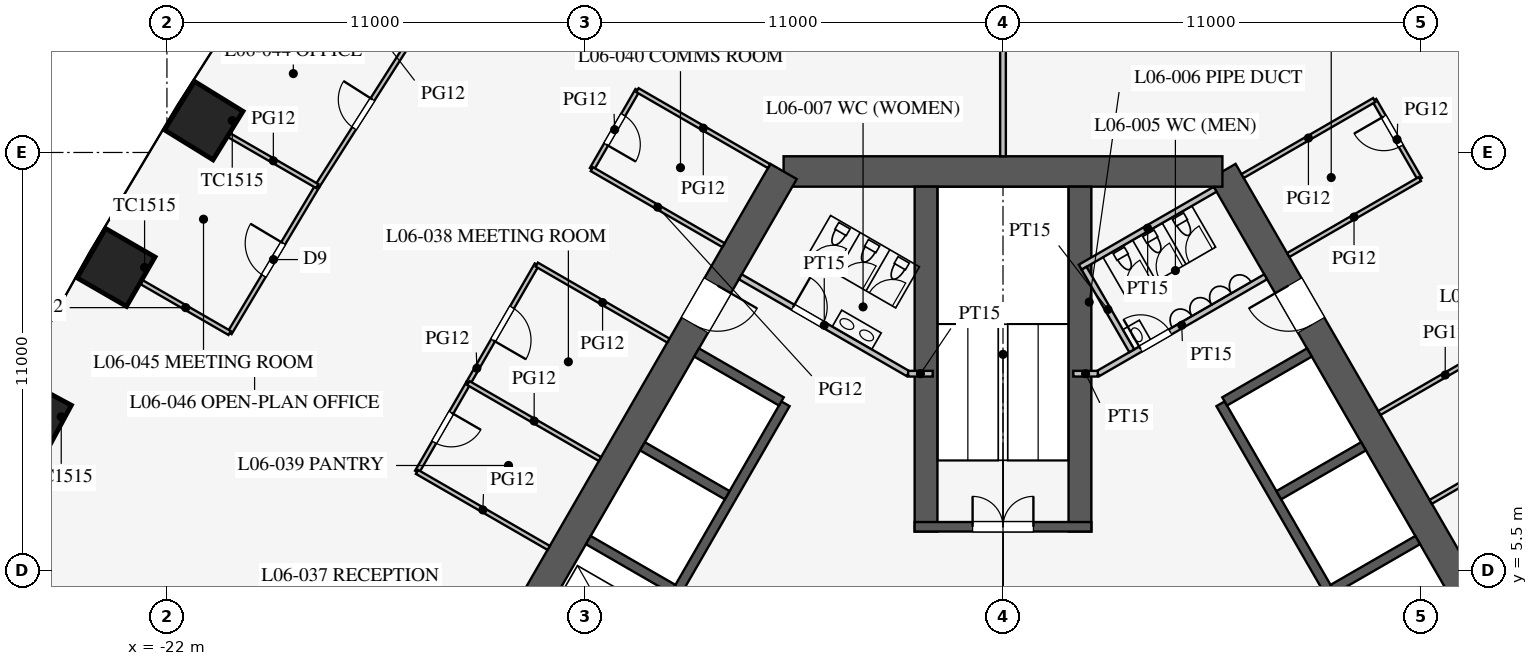
"""IFC4 building model, lengths in metres.
Left out: names, types, materials, properties, quantities, classifications, styles, units other than length and angle.
Written with IfcOpenShell. Run it as: python <this file> out.ifc"""

import sys

from ifc_helpers import new_model, si_unit, direction, frame, frame_2d, origin, origin_2d, place, context, subcontext, project, spatial, rectangle, extrude, element, fill, save


model = new_model("IFC4")
c1 = context("Model", 3, precision=1e-05, world=origin(), true_north=direction((0.0, 1.0)))
c2 = subcontext(c1, "Body", "Model", "MODEL_VIEW")
j1 = project(units=[si_unit("LENGTHUNIT", "METRE"), si_unit("PLANEANGLEUNIT", "RADIAN")], contexts=[c1])
p1 = place(None, origin())
s1 = spatial("IfcSite", under=j1, at=p1, CompositionType="ELEMENT")
p2 = place(p1, origin())
s2 = spatial("IfcBuilding", under=s1, at=p2, CompositionType="ELEMENT")
p3 = place(p2, frame((0.0, 0.0, 29.1)))
s3 = spatial("IfcBuildingStorey", under=s2, at=p3, CompositionType="ELEMENT", Elevation=29.1)
for number, where, z_axis, x_axis in (
    (1, (-21.031, 17.339, 0.0), (0.0, 0.0, 1.0), (-0.525, -0.851, 0.0)),
    (2, (-23.338, 13.474, 0.0), (0.0, 0.0, 1.0), (-0.5, -0.866, 0.0)),
    (3, (-25.531, 9.544, 0.0), (0.0, 0.0, 1.0), (-0.475, -0.88, 0.0)),
):
    element("IfcColumn", number, at=place(p3, frame(where, z_axis=z_axis, x_axis=x_axis)), inside=s3, PredefinedType="COLUMN", context=c2, shape_type="SweptSolid", body=[
        extrude(rectangle(XDim=1.5, YDim=1.5, at=origin_2d()), origin(), (0.0, 0.0, 1.0), 4.2),
    ])
p4 = place(p3, frame((16.743, -3.0, 0.0), z_axis=(0.0, 0.0, 1.0), x_axis=(-0.500002442456, 0.866023993627, 0.0)))
e4 = element("IfcWall", 4, at=p4, inside=s3, PredefinedType="SHEAR", context=c2, shape_type="SweptSolid", body=[
    extrude(rectangle(XDim=21.939, YDim=0.8, at=frame_2d((10.97, 0.0))), origin(), (0.0, 0.0, 1.0), 4.2),
])
p5 = place(p4, frame((17.27, 0.0, 0.0)))
e5 = element("IfcOpeningElement", 5, at=p5, cuts=e4, PredefinedType="OPENING", context=c2, shape_type="SweptSolid", body=[
    extrude(rectangle(XDim=1.2, YDim=2.1, at=frame_2d((0.6, 1.05))), frame((0.0, 0.41, 0.0), z_axis=(0.0, -1.0, 0.0), x_axis=(1.0, 0.0, 0.0)), (0.0, 0.0, 1.0), 0.82),
])
p6 = place(p4, frame((3.47, 0.0, 0.0)))
e6 = element("IfcOpeningElement", 6, at=p6, cuts=e4, PredefinedType="OPENING", context=c2, shape_type="SweptSolid", body=[
    extrude(rectangle(XDim=1.2, YDim=2.1, at=frame_2d((0.6, 1.05))), frame((0.0, 0.41, 0.0), z_axis=(0.0, -1.0, 0.0), x_axis=(1.0, 0.0, 0.0)), (0.0, 0.0, 1.0), 0.82),
])
p7 = place(p3, frame((5.773, 16.0, 0.0), z_axis=(0.0, 0.0, 1.0), x_axis=(-1.0, 0.0, 0.0)))
e7 = element("IfcWall", 7, at=p7, inside=s3, PredefinedType="SHEAR", context=c2, shape_type="SweptSolid", body=[
    extrude(rectangle(XDim=11.547, YDim=0.8, at=frame_2d((5.773, 0.0))), origin(), (0.0, 0.0, 1.0), 4.2),
])
p8 = place(p3, frame((-5.773, 16.0, 0.0), z_axis=(0.0, 0.0, 1.0), x_axis=(-0.500002442456, -0.866023993627, 0.0)))
e8 = element("IfcWall", 8, at=p8, inside=s3, PredefinedType="SHEAR", context=c2, shape_type="SweptSolid", body=[
    extrude(rectangle(XDim=21.939, YDim=0.8, at=frame_2d((10.97, 0.0))), origin(), (0.0, 0.0, 1.0), 4.2),
])
p9 = place(p8, frame((17.27, 0.0, 0.0)))
e9 = element("IfcOpeningElement", 9, at=p9, cuts=e8, PredefinedType="OPENING", context=c2, shape_type="SweptSolid", body=[
    extrude(rectangle(XDim=1.2, YDim=2.1, at=frame_2d((0.6, 1.05))), frame((0.0, 0.41, 0.0), z_axis=(0.0, -1.0, 0.0), x_axis=(1.0, 0.0, 0.0)), (0.0, 0.0, 1.0), 0.82),
])
p10 = place(p8, frame((3.47, 0.0, 0.0)))
e10 = element("IfcOpeningElement", 10, at=p10, cuts=e8, PredefinedType="OPENING", context=c2, shape_type="SweptSolid", body=[
    extrude(rectangle(XDim=1.2, YDim=2.1, at=frame_2d((0.6, 1.05))), frame((0.0, 0.41, 0.0), z_axis=(0.0, -1.0, 0.0), x_axis=(1.0, 0.0, 0.0)), (0.0, 0.0, 1.0), 0.82),
])
p11 = place(p3, frame((11.424, 0.014, 0.0), z_axis=(0.0, 0.0, 1.0), x_axis=(-0.500001763848, 0.866024385424, 0.0)))
e11 = element("IfcWall", 11, at=p11, inside=s3, PredefinedType="SHEAR", context=c2, shape_type="SweptSolid", body=[
    extrude(rectangle(XDim=11.4, YDim=0.25, at=frame_2d((5.7, 0.0))), origin(), (0.0, 0.0, 1.0), 4.2),
])
for number, where, z_axis, x_axis in (
    (12, (8.682, 5.012, 0.0), (0.0, 0.0, 1.0), (0.866, 0.5, 0.0)),
    (13, (7.257, 7.481, 0.0), (0.0, 0.0, 1.0), (0.866, 0.5, 0.0)),
):
    element("IfcWall", number, at=place(p3, frame(where, z_axis=z_axis, x_axis=x_axis)), inside=s3, PredefinedType="SHEAR", context=c2, shape_type="SweptSolid", body=[
        extrude(rectangle(XDim=2.575, YDim=0.25, at=frame_2d((1.288, 0.0))), origin(), (0.0, 0.0, 1.0), 4.2),
    ])
p12 = place(p3, frame((5.832, 9.949, 0.0), z_axis=(0.0, 0.0, 1.0), x_axis=(0.866029291668, 0.499993265928, 0.0)))
e14 = element("IfcWall", 14, at=p12, inside=s3, PredefinedType="SHEAR", context=c2, shape_type="SweptSolid", body=[
    extrude(rectangle(XDim=2.575, YDim=0.25, at=frame_2d((1.288, 0.0))), origin(), (0.0, 0.0, 1.0), 4.2),
])
p13 = place(p3, frame((-5.724, 9.886, 0.0), z_axis=(0.0, 0.0, 1.0), x_axis=(-0.500001763848, -0.866024385424, 0.0)))
e15 = element("IfcWall", 15, at=p13, inside=s3, PredefinedType="SHEAR", context=c2, shape_type="SweptSolid", body=[
    extrude(rectangle(XDim=11.4, YDim=0.25, at=frame_2d((5.7, 0.0))), origin(), (0.0, 0.0, 1.0), 4.2),
])
p14 = place(p13, frame((6.525, 0.0, 0.0)))
e16 = element("IfcOpeningElement", 16, at=p14, cuts=e15, PredefinedType="OPENING", context=c2, shape_type="SweptSolid", body=[
    extrude(rectangle(XDim=1.2, YDim=2.2, at=frame_2d((0.6, 1.1))), frame((0.0, 0.135, 0.0), z_axis=(0.0, -1.0, 0.0), x_axis=(1.0, 0.0, 0.0)), (0.0, 0.0, 1.0), 0.27),
])
p15 = place(p13, frame((9.375, 0.0, 0.0)))
e17 = element("IfcOpeningElement", 17, at=p15, cuts=e15, PredefinedType="OPENING", context=c2, shape_type="SweptSolid", body=[
    extrude(rectangle(XDim=1.2, YDim=2.2, at=frame_2d((0.6, 1.1))), frame((0.0, 0.135, 0.0), z_axis=(0.0, -1.0, 0.0), x_axis=(1.0, 0.0, 0.0)), (0.0, 0.0, 1.0), 0.27),
])
p16 = place(p3, frame((-5.832, 9.949, 0.0), z_axis=(0.0, 0.0, 1.0), x_axis=(-0.866029291668, 0.499993265928, 0.0)))
e18 = element("IfcWall", 18, at=p16, inside=s3, PredefinedType="SHEAR", context=c2, shape_type="SweptSolid", body=[
    extrude(rectangle(XDim=2.575, YDim=0.25, at=frame_2d((1.288, 0.0))), origin(), (0.0, 0.0, 1.0), 4.2),
])
for number, where, z_axis, x_axis in (
    (19, (-7.257, 7.481, 0.0), (0.0, 0.0, 1.0), (-0.866, 0.5, 0.0)),
    (20, (-8.682, 5.012, 0.0), (0.0, 0.0, 1.0), (-0.866, 0.5, 0.0)),
):
    element("IfcWall", number, at=place(p3, frame(where, z_axis=z_axis, x_axis=x_axis)), inside=s3, PredefinedType="SHEAR", context=c2, shape_type="SweptSolid", body=[
        extrude(rectangle(XDim=2.575, YDim=0.25, at=frame_2d((1.288, 0.0))), origin(), (0.0, 0.0, 1.0), 4.2),
    ])
for number, where, z_axis, x_axis in (
    (21, (2.025, 6.525, 0.0), (0.0, 0.0, 1.0), (0.0, 1.0, 0.0)),
    (22, (-2.025, 6.525, 0.0), (0.0, 0.0, 1.0), (0.0, 1.0, 0.0)),
):
    element("IfcWall", number, at=place(p3, frame(where, z_axis=z_axis, x_axis=x_axis)), inside=s3, PredefinedType="SHEAR", context=c2, shape_type="SweptSolid", body=[
        extrude(rectangle(XDim=9.075, YDim=0.6, at=frame_2d((4.538, 0.0))), origin(), (0.0, 0.0, 1.0), 4.2),
    ])
p17 = place(p3, frame((2.325, 6.65, 0.0), z_axis=(0.0, 0.0, 1.0), x_axis=(-1.0, 0.0, 0.0)))
e23 = element("IfcWall", 23, at=p17, inside=s3, PredefinedType="SHEAR", context=c2, shape_type="SweptSolid", body=[
    extrude(rectangle(XDim=4.65, YDim=0.25, at=frame_2d((2.325, 0.0))), origin(), (0.0, 0.0, 1.0), 4.2),
])
p18 = place(p17, frame((1.525, 0.0, 0.0)))
e24 = element("IfcOpeningElement", 24, at=p18, cuts=e23, PredefinedType="OPENING", context=c2, shape_type="SweptSolid", body=[
    extrude(rectangle(XDim=1.6, YDim=2.1, at=frame_2d((0.8, 1.05))), frame((0.0, 0.135, 0.0), z_axis=(0.0, -1.0, 0.0), x_axis=(1.0, 0.0, 0.0)), (0.0, 0.0, 1.0), 0.27),
])
p19 = place(p3, frame((2.495, 10.678, 0.0), z_axis=(0.0, 0.0, 1.0), x_axis=(0.86602216432, 0.500005610874, 0.0)))
e25 = element("IfcWall", 25, at=p19, inside=s3, PredefinedType="PARTITIONING", context=c2, shape_type="SweptSolid", body=[
    extrude(rectangle(XDim=5.1, YDim=0.15, at=frame_2d((2.55, 0.0))), origin(), (0.0, 0.0, 1.0), 4.0),
])
p20 = place(p19, frame((1.3, 0.0, 0.0)))
e26 = element("IfcOpeningElement", 26, at=p20, cuts=e25, PredefinedType="OPENING", context=c2, shape_type="SweptSolid", body=[
    extrude(rectangle(XDim=0.9, YDim=2.1, at=frame_2d((0.45, 1.05))), frame((0.0, 0.085, 0.0), z_axis=(0.0, -1.0, 0.0), x_axis=(1.0, 0.0, 0.0)), (0.0, 0.0, 1.0), 0.17),
])
p21 = place(p3, frame((-2.495, 10.678, 0.0), z_axis=(0.0, 0.0, 1.0), x_axis=(-0.86602216432, 0.500005610874, 0.0)))
e27 = element("IfcWall", 27, at=p21, inside=s3, PredefinedType="PARTITIONING", context=c2, shape_type="SweptSolid", body=[
    extrude(rectangle(XDim=5.1, YDim=0.15, at=frame_2d((2.55, 0.0))), origin(), (0.0, 0.0, 1.0), 4.0),
])
p22 = place(p21, frame((2.6, 0.0, 0.0)))
e28 = element("IfcOpeningElement", 28, at=p22, cuts=e27, PredefinedType="OPENING", context=c2, shape_type="SweptSolid", body=[
    extrude(rectangle(XDim=0.9, YDim=2.1, at=frame_2d((0.45, 1.05))), frame((0.0, 0.085, 0.0), z_axis=(0.0, -1.0, 0.0), x_axis=(1.0, 0.0, 0.0)), (0.0, 0.0, 1.0), 0.17),
])
for number, where, z_axis, x_axis in (
    (29, (2.495, 10.678, 0.0), (0.0, 0.0, 1.0), (-1.0, 0.0, 0.0)),
    (30, (-2.495, 10.678, 0.0), (0.0, 0.0, 1.0), (1.0, 0.0, 0.0)),
):
    element("IfcWall", number, at=place(p3, frame(where, z_axis=z_axis, x_axis=x_axis)), inside=s3, PredefinedType="PARTITIONING", context=c2, shape_type="SweptSolid", body=[
        extrude(rectangle(XDim=0.645, YDim=0.15, at=frame_2d((0.323, 0.0))), origin(), (0.0, 0.0, 1.0), 4.0),
    ])
p23 = place(p3, frame((2.031, 13.482, 0.0), z_axis=(0.0, 0.0, 1.0), x_axis=(0.866050731258, 0.499956128963, 0.0)))
e31 = element("IfcWall", 31, at=p23, inside=s3, PredefinedType="PARTITIONING", context=c2, shape_type="SweptSolid", body=[
    extrude(rectangle(XDim=4.1, YDim=0.15, at=frame_2d((2.05, 0.0))), origin(), (0.0, 0.0, 1.0), 4.0),
])
p24 = place(p3, frame((3.389, 11.281, 0.0), z_axis=(0.0, 0.0, 1.0), x_axis=(-0.499989096993, 0.866031698547, 0.0)))
e32 = element("IfcWall", 32, at=p24, inside=s3, PredefinedType="PARTITIONING", context=c2, shape_type="SweptSolid", body=[
    extrude(rectangle(XDim=2.51, YDim=0.15, at=frame_2d((1.255, 0.0))), origin(), (0.0, 0.0, 1.0), 4.0),
])
p25 = place(p3, frame((0.0, 16.4, 0.0), z_axis=(0.0, 0.0, 1.0), x_axis=(0.0, 1.0, 0.0)))
e33 = element("IfcWall", 33, at=p25, inside=s3, PredefinedType="PARTITIONING", context=c2, shape_type="SweptSolid", body=[
    extrude(rectangle(XDim=18.25, YDim=0.15, at=frame_2d((9.125, 0.0))), origin(), (0.0, 0.0, 1.0), 2.3),
])
p26 = place(p3, frame((10.969, 15.802, 0.0), z_axis=(0.0, 0.0, 1.0), x_axis=(-0.500001309137, 0.866024647952, 0.0)))
e34 = element("IfcWall", 34, at=p26, inside=s3, PredefinedType="PARTITIONING", context=c2, shape_type="SweptSolid", body=[
    extrude(rectangle(XDim=2.4, YDim=0.12, at=frame_2d((1.2, 0.0))), origin(), (0.0, 0.0, 1.0), 2.9),
])
p27 = place(p26, frame((1.0, 0.0, 0.15)))
e35 = element("IfcOpeningElement", 35, at=p27, cuts=e34, PredefinedType="OPENING", context=c2, shape_type="SweptSolid", body=[
    extrude(rectangle(XDim=0.9, YDim=2.1, at=frame_2d((0.45, 1.05))), frame((0.0, 0.07, 0.0), z_axis=(0.0, -1.0, 0.0), x_axis=(1.0, 0.0, 0.0)), (0.0, 0.0, 1.0), 0.14),
])
for number, where, z_axis, x_axis in (
    (36, (11.255, 7.306, 0.0), (0.0, 0.0, 1.0), (0.866, 0.5, 0.0)),
    (37, (6.305, 15.88, 0.0), (0.0, 0.0, 1.0), (0.866, 0.5, 0.0)),
    (38, (9.905, 9.645, 0.0), (0.0, 0.0, 1.0), (0.866, 0.5, 0.0)),
    (39, (7.505, 13.802, 0.0), (0.0, 0.0, 1.0), (0.866, 0.5, 0.0)),
):
    element("IfcWall", number, at=place(p3, frame(where, z_axis=z_axis, x_axis=x_axis)), inside=s3, PredefinedType="PARTITIONING", context=c2, shape_type="SweptSolid", body=[
        extrude(rectangle(XDim=4.0, YDim=0.12, at=frame_2d((2.0, 0.0))), origin(), (0.0, 0.0, 1.0), 2.9),
    ])
p28 = place(p3, frame((-9.619, 18.14, 0.0), z_axis=(0.0, 0.0, 1.0), x_axis=(-0.500001309137, -0.866024647952, 0.0)))
e40 = element("IfcWall", 40, at=p28, inside=s3, PredefinedType="PARTITIONING", context=c2, shape_type="SweptSolid", body=[
    extrude(rectangle(XDim=2.4, YDim=0.12, at=frame_2d((1.2, 0.0))), origin(), (0.0, 0.0, 1.0), 2.9),
])
p29 = place(p28, frame((0.75, 0.0, 0.15)))
e41 = element("IfcOpeningElement", 41, at=p29, cuts=e40, PredefinedType="OPENING", context=c2, shape_type="SweptSolid", body=[
    extrude(rectangle(XDim=0.9, YDim=2.1, at=frame_2d((0.45, 1.05))), frame((0.0, 0.07, 0.0), z_axis=(0.0, -1.0, 0.0), x_axis=(1.0, 0.0, 0.0)), (0.0, 0.0, 1.0), 0.14),
])
p30 = place(p3, frame((-14.069, 10.432, 0.0), z_axis=(0.0, 0.0, 1.0), x_axis=(-0.50000943426, -0.866019956843, 0.0)))
e42 = element("IfcWall", 42, at=p30, inside=s3, PredefinedType="PARTITIONING", context=c2, shape_type="SweptSolid", body=[
    extrude(rectangle(XDim=2.7, YDim=0.12, at=frame_2d((1.35, 0.0))), origin(), (0.0, 0.0, 1.0), 2.9),
])
p31 = place(p30, frame((0.9, 0.0, 0.15)))
e43 = element("IfcOpeningElement", 43, at=p31, cuts=e42, PredefinedType="OPENING", context=c2, shape_type="SweptSolid", body=[
    extrude(rectangle(XDim=0.9, YDim=2.1, at=frame_2d((0.45, 1.05))), frame((0.0, 0.07, 0.0), z_axis=(0.0, -1.0, 0.0), x_axis=(1.0, 0.0, 0.0)), (0.0, 0.0, 1.0), 0.14),
])
p32 = place(p3, frame((-12.269, 13.55, 0.0), z_axis=(0.0, 0.0, 1.0), x_axis=(-0.500012057535, -0.866018442252, 0.0)))
e44 = element("IfcWall", 44, at=p32, inside=s3, PredefinedType="PARTITIONING", context=c2, shape_type="SweptSolid", body=[
    extrude(rectangle(XDim=3.6, YDim=0.12, at=frame_2d((1.8, 0.0))), origin(), (0.0, 0.0, 1.0), 2.9),
])
p33 = place(p32, frame((1.3, 0.0, 0.15)))
e45 = element("IfcOpeningElement", 45, at=p33, cuts=e44, PredefinedType="OPENING", context=c2, shape_type="SweptSolid", body=[
    extrude(rectangle(XDim=1.0, YDim=2.1, at=frame_2d((0.5, 1.05))), frame((0.0, 0.07, 0.0), z_axis=(0.0, -1.0, 0.0), x_axis=(1.0, 0.0, 0.0)), (0.0, 0.0, 1.0), 0.14),
])
for number, where, z_axis, x_axis in (
    (46, (-11.955, 6.094, 0.0), (0.0, 0.0, 1.0), (-0.866, 0.5, 0.0)),
    (47, (-6.155, 16.14, 0.0), (0.0, 0.0, 1.0), (-0.866, 0.5, 0.0)),
    (48, (-10.605, 8.432, 0.0), (0.0, 0.0, 1.0), (-0.866, 0.5, 0.0)),
    (49, (-8.805, 11.55, 0.0), (0.0, 0.0, 1.0), (-0.866, 0.5, 0.0)),
    (50, (-7.355, 14.061, 0.0), (0.0, 0.0, 1.0), (-0.866, 0.5, 0.0)),
):
    element("IfcWall", number, at=place(p3, frame(where, z_axis=z_axis, x_axis=x_axis)), inside=s3, PredefinedType="PARTITIONING", context=c2, shape_type="SweptSolid", body=[
        extrude(rectangle(XDim=4.0, YDim=0.12, at=frame_2d((2.0, 0.0))), origin(), (0.0, 0.0, 1.0), 2.9),
    ])
p34 = place(p3, frame((-18.044, 15.614, 0.0), z_axis=(0.0, 0.0, 1.0), x_axis=(-0.51252396108, -0.858672923364, 0.0)))
e51 = element("IfcWall", 51, at=p34, inside=s3, PredefinedType="PARTITIONING", context=c2, shape_type="SweptSolid", body=[
    extrude(rectangle(XDim=4.5, YDim=0.12, at=frame_2d((2.25, 0.0))), origin(), (0.0, 0.0, 1.0), 2.9),
])
p35 = place(p34, frame((1.75, 0.0, 0.15)))
e52 = element("IfcOpeningElement", 52, at=p35, cuts=e51, PredefinedType="OPENING", context=c2, shape_type="SweptSolid", body=[
    extrude(rectangle(XDim=1.0, YDim=2.1, at=frame_2d((0.5, 1.05))), frame((0.0, 0.07, 0.0), z_axis=(0.0, -1.0, 0.0), x_axis=(1.0, 0.0, 0.0)), (0.0, 0.0, 1.0), 0.14),
])
p36 = place(p3, frame((-15.624, 19.413, 0.0), z_axis=(0.0, 0.0, 1.0), x_axis=(-0.537243691336, -0.843427066272, 0.0)))
e53 = element("IfcWall", 53, at=p36, inside=s3, PredefinedType="PARTITIONING", context=c2, shape_type="SweptSolid", body=[
    extrude(rectangle(XDim=4.504, YDim=0.12, at=frame_2d((2.252, 0.0))), origin(), (0.0, 0.0, 1.0), 2.9),
])
p37 = place(p36, frame((1.8, 0.0, 0.15)))
e54 = element("IfcOpeningElement", 54, at=p37, cuts=e53, PredefinedType="OPENING", context=c2, shape_type="SweptSolid", body=[
    extrude(rectangle(XDim=0.9, YDim=2.1, at=frame_2d((0.45, 1.05))), frame((0.0, 0.07, 0.0), z_axis=(0.0, -1.0, 0.0), x_axis=(1.0, 0.0, 0.0)), (0.0, 0.0, 1.0), 0.14),
])
p38 = place(p3, frame((-20.351, 11.749, 0.0), z_axis=(0.0, 0.0, 1.0), x_axis=(-0.865989150234, 0.500062787734, 0.0)))
e55 = element("IfcWall", 55, at=p38, inside=s3, PredefinedType="PARTITIONING", context=c2, shape_type="SweptSolid", body=[
    extrude(rectangle(XDim=2.67, YDim=0.12, at=frame_2d((1.335, 0.0))), origin(), (0.0, 0.0, 1.0), 2.9),
])
p39 = place(p3, frame((-18.044, 15.614, 0.0), z_axis=(0.0, 0.0, 1.0), x_axis=(-0.866022619654, 0.500004822225, 0.0)))
e56 = element("IfcWall", 56, at=p39, inside=s3, PredefinedType="PARTITIONING", context=c2, shape_type="SweptSolid", body=[
    extrude(rectangle(XDim=2.669, YDim=0.12, at=frame_2d((1.335, 0.0))), origin(), (0.0, 0.0, 1.0), 2.9),
])
p40 = place(p20, origin())
e57 = element("IfcDoor", 57, at=p40, inside=s3, OperationType="SINGLE_SWING_LEFT", PredefinedType="DOOR", context=c2, shape_type="SweptSolid", body=[
    extrude(rectangle(XDim=0.9, YDim=2.1, at=frame_2d((0.45, 1.05))), frame((0.0, 0.025, 0.0), z_axis=(0.0, -1.0, 0.0), x_axis=(1.0, 0.0, 0.0)), (0.0, 0.0, 1.0), 0.05),
])
fill(e26, e57)
p41 = place(p22, frame((0.9, 0.0, 0.0), z_axis=(0.0, 0.0, 1.0), x_axis=(-1.0, 0.0, 0.0)))
e58 = element("IfcDoor", 58, at=p41, inside=s3, OperationType="SINGLE_SWING_LEFT", PredefinedType="DOOR", context=c2, shape_type="SweptSolid", body=[
    extrude(rectangle(XDim=0.9, YDim=2.1, at=frame_2d((0.45, 1.05))), frame((0.0, 0.025, 0.0), z_axis=(0.0, -1.0, 0.0), x_axis=(1.0, 0.0, 0.0)), (0.0, 0.0, 1.0), 0.05),
])
fill(e28, e58)
p42 = place(p18, frame((1.6, 0.0, 0.0), z_axis=(0.0, 0.0, 1.0), x_axis=(-1.0, 0.0, 0.0)))
e59 = element("IfcDoor", 59, at=p42, inside=s3, OperationType="DOUBLE_DOOR_SINGLE_SWING", PredefinedType="DOOR", context=c2, shape_type="SweptSolid", body=[
    extrude(rectangle(XDim=1.6, YDim=2.1, at=frame_2d((0.8, 1.05))), frame((0.0, 0.025, 0.0), z_axis=(0.0, -1.0, 0.0), x_axis=(1.0, 0.0, 0.0)), (0.0, 0.0, 1.0), 0.05),
])
fill(e24, e59)
p43 = place(p5, origin())
e60 = element("IfcDoor", 60, at=p43, inside=s3, OperationType="SINGLE_SWING_RIGHT", PredefinedType="DOOR", context=c2, shape_type="SweptSolid", body=[
    extrude(rectangle(XDim=1.2, YDim=2.1, at=frame_2d((0.6, 1.05))), frame((0.0, 0.025, 0.0), z_axis=(0.0, -1.0, 0.0), x_axis=(1.0, 0.0, 0.0)), (0.0, 0.0, 1.0), 0.05),
])
fill(e5, e60)
p44 = place(p10, origin())
e61 = element("IfcDoor", 61, at=p44, inside=s3, OperationType="SINGLE_SWING_LEFT", PredefinedType="DOOR", context=c2, shape_type="SweptSolid", body=[
    extrude(rectangle(XDim=1.2, YDim=2.1, at=frame_2d((0.6, 1.05))), frame((0.0, 0.025, 0.0), z_axis=(0.0, -1.0, 0.0), x_axis=(1.0, 0.0, 0.0)), (0.0, 0.0, 1.0), 0.05),
])
fill(e10, e61)
p45 = place(p27, origin())
e62 = element("IfcDoor", 62, at=p45, inside=s3, OperationType="SINGLE_SWING_RIGHT", PredefinedType="DOOR", context=c2, shape_type="SweptSolid", body=[
    extrude(rectangle(XDim=0.9, YDim=2.1, at=frame_2d((0.45, 1.05))), frame((0.0, 0.025, 0.0), z_axis=(0.0, -1.0, 0.0), x_axis=(1.0, 0.0, 0.0)), (0.0, 0.0, 1.0), 0.05),
])
fill(e35, e62)
p46 = place(p33, origin())
e63 = element("IfcDoor", 63, at=p46, inside=s3, OperationType="SINGLE_SWING_RIGHT", PredefinedType="DOOR", context=c2, shape_type="SweptSolid", body=[
    extrude(rectangle(XDim=1.0, YDim=2.1, at=frame_2d((0.5, 1.05))), frame((0.0, 0.025, 0.0), z_axis=(0.0, -1.0, 0.0), x_axis=(1.0, 0.0, 0.0)), (0.0, 0.0, 1.0), 0.05),
])
fill(e45, e63)
p47 = place(p31, origin())
e64 = element("IfcDoor", 64, at=p47, inside=s3, OperationType="SINGLE_SWING_LEFT", PredefinedType="DOOR", context=c2, shape_type="SweptSolid", body=[
    extrude(rectangle(XDim=0.9, YDim=2.1, at=frame_2d((0.45, 1.05))), frame((0.0, 0.025, 0.0), z_axis=(0.0, -1.0, 0.0), x_axis=(1.0, 0.0, 0.0)), (0.0, 0.0, 1.0), 0.05),
])
fill(e43, e64)
p48 = place(p29, origin())
e65 = element("IfcDoor", 65, at=p48, inside=s3, OperationType="SINGLE_SWING_RIGHT", PredefinedType="DOOR", context=c2, shape_type="SweptSolid", body=[
    extrude(rectangle(XDim=0.9, YDim=2.1, at=frame_2d((0.45, 1.05))), frame((0.0, 0.025, 0.0), z_axis=(0.0, -1.0, 0.0), x_axis=(1.0, 0.0, 0.0)), (0.0, 0.0, 1.0), 0.05),
])
fill(e41, e65)
p49 = place(p37, frame((0.9, 0.0, 0.0), z_axis=(0.0, 0.0, 1.0), x_axis=(-1.0, 0.0, 0.0)))
e66 = element("IfcDoor", 66, at=p49, inside=s3, OperationType="SINGLE_SWING_RIGHT", PredefinedType="DOOR", context=c2, shape_type="SweptSolid", body=[
    extrude(rectangle(XDim=0.9, YDim=2.1, at=frame_2d((0.45, 1.05))), frame((0.0, 0.025, 0.0), z_axis=(0.0, -1.0, 0.0), x_axis=(1.0, 0.0, 0.0)), (0.0, 0.0, 1.0), 0.05),
])
fill(e54, e66)
p50 = place(p35, frame((1.0, 0.0, 0.0), z_axis=(0.0, 0.0, 1.0), x_axis=(-1.0, 0.0, 0.0)))
e67 = element("IfcDoor", 67, at=p50, inside=s3, OperationType="SINGLE_SWING_RIGHT", PredefinedType="DOOR", context=c2, shape_type="SweptSolid", body=[
    extrude(rectangle(XDim=1.0, YDim=2.1, at=frame_2d((0.5, 1.05))), frame((0.0, 0.025, 0.0), z_axis=(0.0, -1.0, 0.0), x_axis=(1.0, 0.0, 0.0)), (0.0, 0.0, 1.0), 0.05),
])
fill(e52, e67)
save(model, sys.argv[1])
